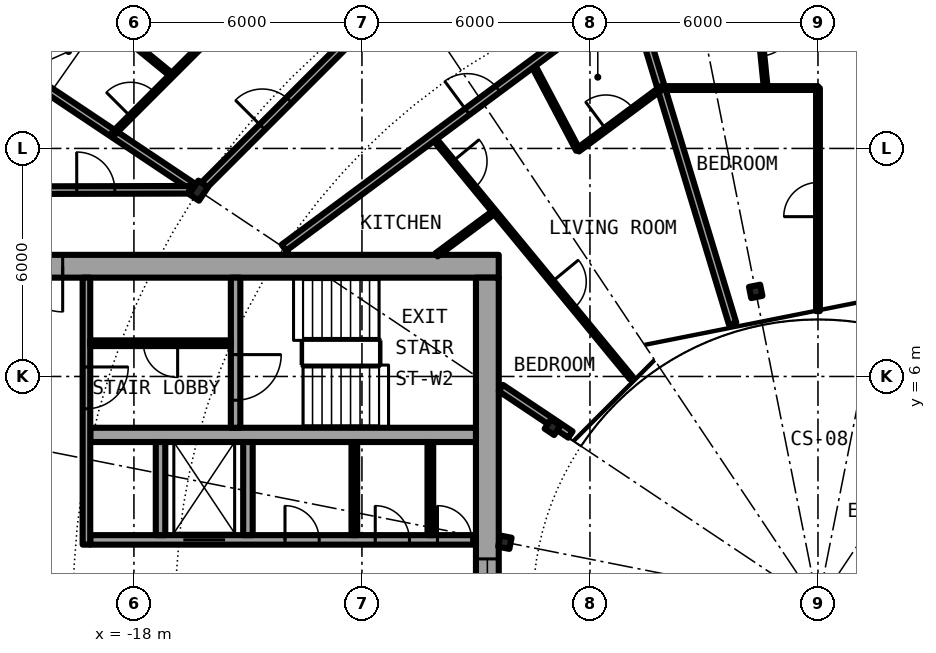
"""IFC4 building model, lengths in metres.
Left out: names, types, materials, properties, quantities, classifications, styles, units other than length and angle.
Written with IfcOpenShell. Run it as: python <this file> out.ifc"""

import sys

from ifc_helpers import new_model, si_unit, direction, frame, frame_2d, origin, origin_2d, place, context, subcontext, project, spatial, rectangle, i_section, extrude, element, fill, save


model = new_model("IFC4")
c1 = context("Model", 3, precision=1e-05, world=origin(), true_north=direction((0.0, 1.0)))
c2 = subcontext(c1, "Body", "Model", "MODEL_VIEW")
j1 = project(units=[si_unit("LENGTHUNIT", "METRE"), si_unit("PLANEANGLEUNIT", "RADIAN")], contexts=[c1])
p1 = place(None, origin())
s1 = spatial("IfcSite", under=j1, at=p1, CompositionType="ELEMENT")
p2 = place(p1, origin())
s2 = spatial("IfcBuilding", under=s1, at=p2, CompositionType="ELEMENT")
p3 = place(p2, frame((0.0, 0.0, 120.8)))
s3 = spatial("IfcBuildingStorey", under=s2, at=p3, CompositionType="ELEMENT", Elevation=120.8)
p4 = place(p3, frame((-16.297, 10.889, 0.0), z_axis=(0.0, 0.0, 1.0), x_axis=(-0.831469612303, 0.55557023302, 0.0)))
e1 = element("IfcColumn", 1, at=p4, inside=s3, PredefinedType="COLUMN", context=c2, shape_type="SweptSolid", body=[
    extrude(i_section(OverallWidth=0.307, OverallDepth=0.432, WebThickness=0.021, FlangeThickness=0.04, FilletRadius=0.027, at=origin_2d()), origin(), (0.0, 0.0, 1.0), 3.05),
])
for number, where, z_axis, x_axis in (
    (2, (-1.639, 8.239, 0.0), (0.0, 0.0, 1.0), (-0.195, 0.981, 0.0)),
    (3, (-6.984, 4.667, 0.0), (0.0, 0.0, 1.0), (-0.831, 0.556, 0.0)),
    (4, (-8.239, 1.639, 0.0), (0.0, 0.0, 1.0), (-0.981, 0.195, 0.0)),
):
    element("IfcColumn", number, at=place(p3, frame(where, z_axis=z_axis, x_axis=x_axis)), inside=s3, PredefinedType="COLUMN", context=c2, shape_type="SweptSolid", body=[
        extrude(i_section(OverallWidth=0.3, OverallDepth=0.3, WebThickness=0.011, FlangeThickness=0.019, FilletRadius=0.027, at=origin_2d()), origin(), (0.0, 0.0, 1.0), 3.05),
    ])
p5 = place(p3, frame((-8.4, 8.9, 0.0), z_axis=(0.0, 0.0, 1.0), x_axis=(-1.0, 0.0, 0.0)))
e5 = element("IfcWall", 5, at=p5, inside=s3, PredefinedType="SHEAR", context=c2, shape_type="SweptSolid", body=[
    extrude(rectangle(XDim=13.8, YDim=0.6, at=frame_2d((6.9, 0.0))), origin(), (0.0, 0.0, 1.0), 3.05),
])
p6 = place(p5, frame((11.475, 0.0, 0.0)))
e6 = element("IfcOpeningElement", 6, at=p6, cuts=e5, PredefinedType="OPENING", context=c2, shape_type="SweptSolid", body=[
    extrude(rectangle(XDim=1.2, YDim=2.3, at=frame_2d((0.6, 1.15))), frame((0.0, 0.31, 0.0), z_axis=(0.0, -1.0, 0.0), x_axis=(1.0, 0.0, 0.0)), (0.0, 0.0, 1.0), 0.62),
])
p7 = place(p3, frame((-8.7, 8.6, 0.0), z_axis=(0.0, 0.0, 1.0), x_axis=(0.0, -1.0, 0.0)))
e7 = element("IfcWall", 7, at=p7, inside=s3, PredefinedType="SHEAR", context=c2, shape_type="SweptSolid", body=[
    extrude(rectangle(XDim=17.2, YDim=0.6, at=frame_2d((8.6, 0.0))), origin(), (0.0, 0.0, 1.0), 3.05),
])
p8 = place(p7, frame((7.4, 0.0, 0.1)))
e8 = element("IfcOpeningElement", 8, at=p8, cuts=e7, PredefinedType="OPENING", context=c2, shape_type="SweptSolid", body=[
    extrude(rectangle(XDim=2.4, YDim=2.2, at=frame_2d((1.2, 1.1))), frame((0.0, 0.31, 0.0), z_axis=(0.0, -1.0, 0.0), x_axis=(1.0, 0.0, 0.0)), (0.0, 0.0, 1.0), 0.62),
])
p9 = place(p3, frame((-19.15, 1.7, 0.0), z_axis=(0.0, 0.0, 1.0), x_axis=(1.0, 0.0, 0.0)))
e9 = element("IfcWall", 9, at=p9, inside=s3, PredefinedType="SHEAR", context=c2, shape_type="SweptSolid", body=[
    extrude(rectangle(XDim=10.15, YDim=0.25, at=frame_2d((5.075, 0.0))), origin(), (0.0, 0.0, 1.0), 3.05),
])
p10 = place(p9, frame((2.45, 0.0, 0.0)))
e10 = element("IfcOpeningElement", 10, at=p10, cuts=e9, PredefinedType="OPENING", context=c2, shape_type="SweptSolid", body=[
    extrude(rectangle(XDim=1.1, YDim=2.3, at=frame_2d((0.55, 1.15))), frame((0.0, 0.135, 0.0), z_axis=(0.0, -1.0, 0.0), x_axis=(1.0, 0.0, 0.0)), (0.0, 0.0, 1.0), 0.27),
])
p11 = place(p9, frame((9.137, 0.0, 0.0)))
e11 = element("IfcOpeningElement", 11, at=p11, cuts=e9, PredefinedType="OPENING", context=c2, shape_type="SweptSolid", body=[
    extrude(rectangle(XDim=0.9, YDim=2.3, at=frame_2d((0.45, 1.15))), frame((0.0, 0.135, 0.0), z_axis=(0.0, -1.0, 0.0), x_axis=(1.0, 0.0, 0.0)), (0.0, 0.0, 1.0), 0.27),
])
p12 = place(p9, frame((7.5, 0.0, 0.0)))
e12 = element("IfcOpeningElement", 12, at=p12, cuts=e9, PredefinedType="OPENING", context=c2, shape_type="SweptSolid", body=[
    extrude(rectangle(XDim=0.9, YDim=2.3, at=frame_2d((0.45, 1.15))), frame((0.0, 0.135, 0.0), z_axis=(0.0, -1.0, 0.0), x_axis=(1.0, 0.0, 0.0)), (0.0, 0.0, 1.0), 0.27),
])
p13 = place(p9, frame((5.125, 0.0, 0.0)))
e13 = element("IfcOpeningElement", 13, at=p13, cuts=e9, PredefinedType="OPENING", context=c2, shape_type="SweptSolid", body=[
    extrude(rectangle(XDim=0.9, YDim=2.3, at=frame_2d((0.45, 1.15))), frame((0.0, 0.135, 0.0), z_axis=(0.0, -1.0, 0.0), x_axis=(1.0, 0.0, 0.0)), (0.0, 0.0, 1.0), 0.27),
])
p14 = place(p3, frame((-9.0, 4.462, 0.0), z_axis=(0.0, 0.0, 1.0), x_axis=(-1.0, 0.0, 0.0)))
e14 = element("IfcWall", 14, at=p14, inside=s3, PredefinedType="SHEAR", context=c2, shape_type="SweptSolid", body=[
    extrude(rectangle(XDim=10.15, YDim=0.375, at=frame_2d((5.075, 0.0))), origin(), (0.0, 0.0, 1.0), 3.05),
])
p15 = place(p3, frame((-15.325, 8.6, 0.0), z_axis=(0.0, 0.0, 1.0), x_axis=(0.0, -1.0, 0.0)))
e15 = element("IfcWall", 15, at=p15, inside=s3, PredefinedType="SHEAR", context=c2, shape_type="SweptSolid", body=[
    extrude(rectangle(XDim=3.95, YDim=0.25, at=frame_2d((1.975, 0.0))), origin(), (0.0, 0.0, 1.0), 3.05),
])
p16 = place(p15, frame((2.025, 0.0, 0.0)))
e16 = element("IfcOpeningElement", 16, at=p16, cuts=e15, PredefinedType="OPENING", context=c2, shape_type="SweptSolid", body=[
    extrude(rectangle(XDim=1.2, YDim=2.3, at=frame_2d((0.6, 1.15))), frame((0.0, 0.135, 0.0), z_axis=(0.0, -1.0, 0.0), x_axis=(1.0, 0.0, 0.0)), (0.0, 0.0, 1.0), 0.27),
])
for number, where, z_axis, x_axis in (
    (17, (-15.0, 1.825, 0.0), (0.0, 0.0, 1.0), (0.0, 1.0, 0.0)),
    (18, (-17.3, 1.825, 0.0), (0.0, 0.0, 1.0), (0.0, 1.0, 0.0)),
):
    element("IfcWall", number, at=place(p3, frame(where, z_axis=z_axis, x_axis=x_axis)), inside=s3, PredefinedType="SOLIDWALL", context=c2, shape_type="SweptSolid", body=[
        extrude(rectangle(XDim=2.45, YDim=0.25, at=frame_2d((1.225, 0.0))), origin(), (0.0, 0.0, 1.0), 2.7),
    ])
p17 = place(p3, frame((-19.25, 8.6, 0.0), z_axis=(0.0, 0.0, 1.0), x_axis=(0.0, -1.0, 0.0)))
e19 = element("IfcWall", 19, at=p17, inside=s3, PredefinedType="SOLIDWALL", context=c2, shape_type="SweptSolid", body=[
    extrude(rectangle(XDim=7.025, YDim=0.2, at=frame_2d((3.513, 0.0))), origin(), (0.0, 0.0, 1.0), 2.7),
])
p18 = place(p17, frame((2.35, 0.0, 0.0)))
e20 = element("IfcOpeningElement", 20, at=p18, cuts=e19, PredefinedType="OPENING", context=c2, shape_type="SweptSolid", body=[
    extrude(rectangle(XDim=1.1, YDim=2.3, at=frame_2d((0.55, 1.15))), frame((0.0, 0.11, 0.0), z_axis=(0.0, -1.0, 0.0), x_axis=(1.0, 0.0, 0.0)), (0.0, 0.0, 1.0), 0.22),
])
for number, where, z_axis, x_axis in (
    (21, (-10.2, 1.825, 0.0), (0.0, 0.0, 1.0), (0.0, 1.0, 0.0)),
    (22, (-12.2, 1.825, 0.0), (0.0, 0.0, 1.0), (0.0, 1.0, 0.0)),
):
    element("IfcWall", number, at=place(p3, frame(where, z_axis=z_axis, x_axis=x_axis)), inside=s3, PredefinedType="PARTITIONING", context=c2, shape_type="SweptSolid", body=[
        extrude(rectangle(XDim=2.45, YDim=0.15, at=frame_2d((1.225, 0.0))), origin(), (0.0, 0.0, 1.0), 2.7),
    ])
p19 = place(p3, frame((-15.45, 6.875, 0.0), z_axis=(0.0, 0.0, 1.0), x_axis=(-1.0, 0.0, 0.0)))
e23 = element("IfcWall", 23, at=p19, inside=s3, PredefinedType="PARTITIONING", context=c2, shape_type="SweptSolid", body=[
    extrude(rectangle(XDim=3.7, YDim=0.15, at=frame_2d((1.85, 0.0))), origin(), (0.0, 0.0, 1.0), 2.7),
])
p20 = place(p19, frame((1.4, 0.0, 0.0)))
e24 = element("IfcOpeningElement", 24, at=p20, cuts=e23, PredefinedType="OPENING", context=c2, shape_type="SweptSolid", body=[
    extrude(rectangle(XDim=0.9, YDim=2.3, at=frame_2d((0.45, 1.15))), frame((0.0, 0.085, 0.0), z_axis=(0.0, -1.0, 0.0), x_axis=(1.0, 0.0, 0.0)), (0.0, 0.0, 1.0), 0.17),
])
p21 = place(p3, frame((-4.907, 16.172, 0.0), z_axis=(0.0, 0.0, 1.0), x_axis=(0.289977130626, -0.957033575019, 0.0)))
e25 = element("IfcWall", 25, at=p21, inside=s3, PredefinedType="PARTITIONING", context=c2, shape_type="SweptSolid", body=[
    extrude(rectangle(XDim=9.18, YDim=0.2, at=frame_2d((4.59, 0.0))), origin(), (0.0, 0.0, 1.0), 2.7),
])
p22 = place(p3, frame((-22.595, 15.098, 0.0), z_axis=(0.0, 0.0, 1.0), x_axis=(0.831406593008, -0.555664536482, 0.0)))
e26 = element("IfcWall", 26, at=p22, inside=s3, PredefinedType="PARTITIONING", context=c2, shape_type="SweptSolid", body=[
    extrude(rectangle(XDim=7.358, YDim=0.2, at=frame_2d((3.679, 0.0))), origin(), (0.0, 0.0, 1.0), 2.7),
])
p23 = place(p3, frame((-21.023, 17.22, 0.0), z_axis=(0.0, 0.0, 1.0), x_axis=(0.773517471898, -0.633774976367, 0.0)))
e27 = element("IfcWall", 27, at=p23, inside=s3, PredefinedType="PARTITIONING", context=c2, shape_type="SweptSolid", body=[
    extrude(rectangle(XDim=5.196, YDim=0.1, at=frame_2d((2.598, 0.0))), origin(), (0.0, 0.0, 1.0), 2.7),
])
p24 = place(p3, frame((-10.132, 12.296, 0.0), z_axis=(0.0, 0.0, 1.0), x_axis=(0.635976043025, -0.771708800454, 0.0)))
e28 = element("IfcWall", 28, at=p24, inside=s3, PredefinedType="PARTITIONING", context=c2, shape_type="SweptSolid", body=[
    extrude(rectangle(XDim=8.213, YDim=0.1, at=frame_2d((4.106, 0.0))), origin(), (0.0, 0.0, 1.0), 2.7),
])
p25 = place(p24, frame((0.823, 0.0, 0.0)))
e29 = element("IfcOpeningElement", 29, at=p25, cuts=e28, PredefinedType="OPENING", context=c2, shape_type="SweptSolid", body=[
    extrude(rectangle(XDim=0.9, YDim=2.3, at=frame_2d((0.45, 1.15))), frame((0.0, 0.06, 0.0), z_axis=(0.0, -1.0, 0.0), x_axis=(1.0, 0.0, 0.0)), (0.0, 0.0, 1.0), 0.12),
])
p26 = place(p24, frame((4.929, 0.0, 0.0)))
e30 = element("IfcOpeningElement", 30, at=p26, cuts=e28, PredefinedType="OPENING", context=c2, shape_type="SweptSolid", body=[
    extrude(rectangle(XDim=0.9, YDim=2.3, at=frame_2d((0.45, 1.15))), frame((0.0, 0.06, 0.0), z_axis=(0.0, -1.0, 0.0), x_axis=(1.0, 0.0, 0.0)), (0.0, 0.0, 1.0), 0.12),
])
p27 = place(p3, frame((-7.519, 14.234, 0.0), z_axis=(0.0, 0.0, 1.0), x_axis=(0.467001992543, -0.884256263173, 0.0)))
e31 = element("IfcWall", 31, at=p27, inside=s3, PredefinedType="PARTITIONING", context=c2, shape_type="SweptSolid", body=[
    extrude(rectangle(XDim=2.572, YDim=0.1, at=frame_2d((1.286, 0.0))), origin(), (0.0, 0.0, 1.0), 2.7),
])
p28 = place(p3, frame((-1.635, 16.172, 0.0), z_axis=(0.0, 0.0, 1.0), x_axis=(0.100527855112, -0.994934244233, 0.0)))
e32 = element("IfcWall", 32, at=p28, inside=s3, PredefinedType="PARTITIONING", context=c2, shape_type="SweptSolid", body=[
    extrude(rectangle(XDim=2.596, YDim=0.1, at=frame_2d((1.298, 0.0))), origin(), (0.0, 0.0, 1.0), 2.7),
])
p29 = place(p28, frame((0.848, 0.0, 0.0)))
e33 = element("IfcOpeningElement", 33, at=p29, cuts=e32, PredefinedType="OPENING", context=c2, shape_type="SweptSolid", body=[
    extrude(rectangle(XDim=0.9, YDim=2.3, at=frame_2d((0.45, 1.15))), frame((0.0, 0.06, 0.0), z_axis=(0.0, -1.0, 0.0), x_axis=(1.0, 0.0, 0.0)), (0.0, 0.0, 1.0), 0.12),
])
p30 = place(p3, frame((0.0, 7.72, 0.0), z_axis=(0.0, 0.0, 1.0), x_axis=(0.0, 1.0, 0.0)))
e34 = element("IfcWall", 34, at=p30, inside=s3, PredefinedType="PARTITIONING", context=c2, shape_type="SweptSolid", body=[
    extrude(rectangle(XDim=5.869, YDim=0.1, at=frame_2d((2.935, 0.0))), origin(), (0.0, 0.0, 1.0), 2.7),
])
p31 = place(p30, frame((2.485, 0.0, 0.0)))
e35 = element("IfcOpeningElement", 35, at=p31, cuts=e34, PredefinedType="OPENING", context=c2, shape_type="SweptSolid", body=[
    extrude(rectangle(XDim=0.9, YDim=2.3, at=frame_2d((0.45, 1.15))), frame((0.0, 0.06, 0.0), z_axis=(0.0, -1.0, 0.0), x_axis=(1.0, 0.0, 0.0)), (0.0, 0.0, 1.0), 0.12),
])
p32 = place(p3, frame((-6.513, 4.472, 0.0), z_axis=(0.0, 0.0, 1.0), x_axis=(-0.831333375071, 0.555774072347, 0.0)))
e36 = element("IfcWall", 36, at=p32, inside=s3, PredefinedType="PARTITIONING", context=c2, shape_type="SweptSolid", body=[
    extrude(rectangle(XDim=2.203, YDim=0.2, at=frame_2d((1.101, 0.0))), origin(), (0.0, 0.0, 1.0), 2.7),
])
p33 = place(p3, frame((-21.675, 10.9, 0.0), z_axis=(0.0, 0.0, 1.0), x_axis=(0.999997173357, 0.002377662213, 0.0)))
e37 = element("IfcWall", 37, at=p33, inside=s3, PredefinedType="PARTITIONING", context=c2, shape_type="SweptSolid", body=[
    extrude(rectangle(XDim=5.134, YDim=0.2, at=frame_2d((2.567, 0.0))), origin(), (0.0, 0.0, 1.0), 2.7),
])
p34 = place(p33, frame((2.171, 0.0, 0.0)))
e38 = element("IfcOpeningElement", 38, at=p34, cuts=e37, PredefinedType="OPENING", context=c2, shape_type="SweptSolid", body=[
    extrude(rectangle(XDim=1.0, YDim=2.3, at=frame_2d((0.5, 1.15))), frame((0.0, 0.11, 0.0), z_axis=(0.0, -1.0, 0.0), x_axis=(1.0, 0.0, 0.0)), (0.0, 0.0, 1.0), 0.22),
])
p35 = place(p3, frame((-10.039, 9.2, 0.0), z_axis=(0.0, 0.0, 1.0), x_axis=(0.803149591038, 0.595777420196, 0.0)))
e39 = element("IfcWall", 39, at=p35, inside=s3, PredefinedType="PARTITIONING", context=c2, shape_type="SweptSolid", body=[
    extrude(rectangle(XDim=1.9, YDim=0.1, at=frame_2d((0.95, 0.0))), origin(), (0.0, 0.0, 1.0), 2.7),
])
p36 = place(p3, frame((-6.318, 11.96, 0.0), z_axis=(0.0, 0.0, 1.0), x_axis=(0.803128348509, 0.595806055542, 0.0)))
e40 = element("IfcWall", 40, at=p36, inside=s3, PredefinedType="PARTITIONING", context=c2, shape_type="SweptSolid", body=[
    extrude(rectangle(XDim=2.734, YDim=0.1, at=frame_2d((1.367, 0.0))), origin(), (0.0, 0.0, 1.0), 2.7),
])
p37 = place(p36, frame((0.917, 0.0, 0.0)))
e41 = element("IfcOpeningElement", 41, at=p37, cuts=e40, PredefinedType="OPENING", context=c2, shape_type="SweptSolid", body=[
    extrude(rectangle(XDim=0.9, YDim=2.3, at=frame_2d((0.45, 1.15))), frame((0.0, 0.06, 0.0), z_axis=(0.0, -1.0, 0.0), x_axis=(1.0, 0.0, 0.0)), (0.0, 0.0, 1.0), 0.12),
])
p38 = place(p3, frame((-4.122, 13.589, 0.0), z_axis=(0.0, 0.0, 1.0), x_axis=(1.0, 0.0, 0.0)))
e42 = element("IfcWall", 42, at=p38, inside=s3, PredefinedType="PARTITIONING", context=c2, shape_type="SweptSolid", body=[
    extrude(rectangle(XDim=4.122, YDim=0.1, at=frame_2d((2.061, 0.0))), origin(), (0.0, 0.0, 1.0), 2.7),
])
p39 = place(p3, frame((-14.052, 9.389, 0.0), z_axis=(0.0, 0.0, 1.0), x_axis=(0.803204584823, 0.59570327758, 0.0)))
e43 = element("IfcWall", 43, at=p39, inside=s3, PredefinedType="PARTITIONING", context=c2, shape_type="SweptSolid", body=[
    extrude(rectangle(XDim=11.387, YDim=0.2, at=frame_2d((5.693, 0.0))), origin(), (0.0, 0.0, 1.0), 2.7),
])
p40 = place(p39, frame((6.007, 0.0, 0.0)))
e44 = element("IfcOpeningElement", 44, at=p40, cuts=e43, PredefinedType="OPENING", context=c2, shape_type="SweptSolid", body=[
    extrude(rectangle(XDim=1.0, YDim=2.3, at=frame_2d((0.5, 1.15))), frame((0.0, 0.11, 0.0), z_axis=(0.0, -1.0, 0.0), x_axis=(1.0, 0.0, 0.0)), (0.0, 0.0, 1.0), 0.22),
])
p41 = place(p3, frame((-16.186, 11.0, 0.0), z_axis=(0.0, 0.0, 1.0), x_axis=(0.707106781187, 0.707106781187, 0.0)))
e45 = element("IfcWall", 45, at=p41, inside=s3, PredefinedType="PARTITIONING", context=c2, shape_type="SweptSolid", body=[
    extrude(rectangle(XDim=7.334, YDim=0.2, at=frame_2d((3.667, 0.0))), origin(), (0.0, 0.0, 1.0), 2.39),
])
p42 = place(p41, frame((2.211, 0.0, 0.0)))
e46 = element("IfcOpeningElement", 46, at=p42, cuts=e45, PredefinedType="OPENING", context=c2, shape_type="SweptSolid", body=[
    extrude(rectangle(XDim=1.0, YDim=2.3, at=frame_2d((0.5, 1.15))), frame((0.0, 0.11, 0.0), z_axis=(0.0, -1.0, 0.0), x_axis=(1.0, 0.0, 0.0)), (0.0, 0.0, 1.0), 0.22),
])
p43 = place(p3, frame((-18.542, 12.389, 0.0), z_axis=(0.0, 0.0, 1.0), x_axis=(0.707190945535, 0.707022606819, 0.0)))
e47 = element("IfcWall", 47, at=p43, inside=s3, PredefinedType="PARTITIONING", context=c2, shape_type="SweptSolid", body=[
    extrude(rectangle(XDim=4.351, YDim=0.1, at=frame_2d((2.175, 0.0))), origin(), (0.0, 0.0, 1.0), 2.7),
])
p44 = place(p43, frame((0.639, 0.0, 0.0)))
e48 = element("IfcOpeningElement", 48, at=p44, cuts=e47, PredefinedType="OPENING", context=c2, shape_type="SweptSolid", body=[
    extrude(rectangle(XDim=0.9, YDim=2.3, at=frame_2d((0.45, 1.15))), frame((0.0, 0.06, 0.0), z_axis=(0.0, -1.0, 0.0), x_axis=(1.0, 0.0, 0.0)), (0.0, 0.0, 1.0), 0.12),
])
p45 = place(p10, origin())
e49 = element("IfcDoor", 49, at=p45, inside=s3, OperationType="DOUBLE_DOOR_SLIDING", PredefinedType="DOOR", context=c2, shape_type="SweptSolid", body=[
    extrude(rectangle(XDim=1.1, YDim=2.3, at=frame_2d((0.55, 1.15))), frame((0.0, 0.025, 0.0), z_axis=(0.0, -1.0, 0.0), x_axis=(1.0, 0.0, 0.0)), (0.0, 0.0, 1.0), 0.05),
])
fill(e10, e49)
p46 = place(p11, origin())
e50 = element("IfcDoor", 50, at=p46, inside=s3, OperationType="SINGLE_SWING_LEFT", PredefinedType="DOOR", context=c2, shape_type="SweptSolid", body=[
    extrude(rectangle(XDim=0.9, YDim=2.3, at=frame_2d((0.45, 1.15))), frame((0.0, 0.025, 0.0), z_axis=(0.0, -1.0, 0.0), x_axis=(1.0, 0.0, 0.0)), (0.0, 0.0, 1.0), 0.05),
])
fill(e11, e50)
p47 = place(p12, origin())
e51 = element("IfcDoor", 51, at=p47, inside=s3, OperationType="SINGLE_SWING_LEFT", PredefinedType="DOOR", context=c2, shape_type="SweptSolid", body=[
    extrude(rectangle(XDim=0.9, YDim=2.3, at=frame_2d((0.45, 1.15))), frame((0.0, 0.025, 0.0), z_axis=(0.0, -1.0, 0.0), x_axis=(1.0, 0.0, 0.0)), (0.0, 0.0, 1.0), 0.05),
])
fill(e12, e51)
p48 = place(p13, origin())
e52 = element("IfcDoor", 52, at=p48, inside=s3, OperationType="SINGLE_SWING_LEFT", PredefinedType="DOOR", context=c2, shape_type="SweptSolid", body=[
    extrude(rectangle(XDim=0.9, YDim=2.3, at=frame_2d((0.45, 1.15))), frame((0.0, 0.025, 0.0), z_axis=(0.0, -1.0, 0.0), x_axis=(1.0, 0.0, 0.0)), (0.0, 0.0, 1.0), 0.05),
])
fill(e13, e52)
p49 = place(p20, origin())
e53 = element("IfcDoor", 53, at=p49, inside=s3, OperationType="SINGLE_SWING_LEFT", PredefinedType="DOOR", context=c2, shape_type="SweptSolid", body=[
    extrude(rectangle(XDim=0.9, YDim=2.3, at=frame_2d((0.45, 1.15))), frame((0.0, 0.025, 0.0), z_axis=(0.0, -1.0, 0.0), x_axis=(1.0, 0.0, 0.0)), (0.0, 0.0, 1.0), 0.05),
])
fill(e24, e53)
p50 = place(p16, origin())
e54 = element("IfcDoor", 54, at=p50, inside=s3, OperationType="SINGLE_SWING_LEFT", PredefinedType="DOOR", context=c2, shape_type="SweptSolid", body=[
    extrude(rectangle(XDim=1.2, YDim=2.3, at=frame_2d((0.6, 1.15))), frame((0.0, 0.025, 0.0), z_axis=(0.0, -1.0, 0.0), x_axis=(1.0, 0.0, 0.0)), (0.0, 0.0, 1.0), 0.05),
])
fill(e16, e54)
p51 = place(p18, origin())
e55 = element("IfcDoor", 55, at=p51, inside=s3, OperationType="SINGLE_SWING_RIGHT", PredefinedType="DOOR", context=c2, shape_type="SweptSolid", body=[
    extrude(rectangle(XDim=1.1, YDim=2.3, at=frame_2d((0.55, 1.15))), frame((0.0, 0.025, 0.0), z_axis=(0.0, -1.0, 0.0), x_axis=(1.0, 0.0, 0.0)), (0.0, 0.0, 1.0), 0.05),
])
fill(e20, e55)
p52 = place(p6, origin())
e56 = element("IfcDoor", 56, at=p52, inside=s3, OperationType="SINGLE_SWING_LEFT", PredefinedType="DOOR", context=c2, shape_type="SweptSolid", body=[
    extrude(rectangle(XDim=1.2, YDim=2.3, at=frame_2d((0.6, 1.15))), frame((0.0, 0.025, 0.0), z_axis=(0.0, -1.0, 0.0), x_axis=(1.0, 0.0, 0.0)), (0.0, 0.0, 1.0), 0.05),
])
fill(e6, e56)
p53 = place(p8, origin())
e57 = element("IfcWindow", 57, at=p53, inside=s3, PartitioningType="SINGLE_PANEL", PredefinedType="WINDOW", context=c2, shape_type="SweptSolid", body=[
    extrude(rectangle(XDim=2.4, YDim=2.2, at=frame_2d((1.2, 1.1))), frame((0.0, 0.03, 0.0), z_axis=(0.0, -1.0, 0.0), x_axis=(1.0, 0.0, 0.0)), (0.0, 0.0, 1.0), 0.06),
])
fill(e8, e57)
p54 = place(p42, origin())
e58 = element("IfcDoor", 58, at=p54, inside=s3, OperationType="SINGLE_SWING_LEFT", PredefinedType="DOOR", context=c2, shape_type="SweptSolid", body=[
    extrude(rectangle(XDim=1.0, YDim=2.3, at=frame_2d((0.5, 1.15))), frame((0.0, 0.025, 0.0), z_axis=(0.0, -1.0, 0.0), x_axis=(1.0, 0.0, 0.0)), (0.0, 0.0, 1.0), 0.05),
])
fill(e46, e58)
p55 = place(p44, origin())
e59 = element("IfcDoor", 59, at=p55, inside=s3, OperationType="SINGLE_SWING_LEFT", PredefinedType="DOOR", context=c2, shape_type="SweptSolid", body=[
    extrude(rectangle(XDim=0.9, YDim=2.3, at=frame_2d((0.45, 1.15))), frame((0.0, 0.025, 0.0), z_axis=(0.0, -1.0, 0.0), x_axis=(1.0, 0.0, 0.0)), (0.0, 0.0, 1.0), 0.05),
])
fill(e48, e59)
p56 = place(p29, origin())
e60 = element("IfcDoor", 60, at=p56, inside=s3, OperationType="SINGLE_SWING_LEFT", PredefinedType="DOOR", context=c2, shape_type="SweptSolid", body=[
    extrude(rectangle(XDim=0.9, YDim=2.3, at=frame_2d((0.45, 1.15))), frame((0.0, 0.025, 0.0), z_axis=(0.0, -1.0, 0.0), x_axis=(1.0, 0.0, 0.0)), (0.0, 0.0, 1.0), 0.05),
])
fill(e33, e60)
p57 = place(p31, origin())
e61 = element("IfcDoor", 61, at=p57, inside=s3, OperationType="SINGLE_SWING_RIGHT", PredefinedType="DOOR", context=c2, shape_type="SweptSolid", body=[
    extrude(rectangle(XDim=0.9, YDim=2.3, at=frame_2d((0.45, 1.15))), frame((0.0, 0.025, 0.0), z_axis=(0.0, -1.0, 0.0), x_axis=(1.0, 0.0, 0.0)), (0.0, 0.0, 1.0), 0.05),
])
fill(e35, e61)
p58 = place(p40, origin())
e62 = element("IfcDoor", 62, at=p58, inside=s3, OperationType="SINGLE_SWING_RIGHT", PredefinedType="DOOR", context=c2, shape_type="SweptSolid", body=[
    extrude(rectangle(XDim=1.0, YDim=2.3, at=frame_2d((0.5, 1.15))), frame((0.0, 0.025, 0.0), z_axis=(0.0, -1.0, 0.0), x_axis=(1.0, 0.0, 0.0)), (0.0, 0.0, 1.0), 0.05),
])
fill(e44, e62)
p59 = place(p37, origin())
e63 = element("IfcDoor", 63, at=p59, inside=s3, OperationType="SINGLE_SWING_RIGHT", PredefinedType="DOOR", context=c2, shape_type="SweptSolid", body=[
    extrude(rectangle(XDim=0.9, YDim=2.3, at=frame_2d((0.45, 1.15))), frame((0.0, 0.025, 0.0), z_axis=(0.0, -1.0, 0.0), x_axis=(1.0, 0.0, 0.0)), (0.0, 0.0, 1.0), 0.05),
])
fill(e41, e63)
p60 = place(p25, origin())
e64 = element("IfcDoor", 64, at=p60, inside=s3, OperationType="SINGLE_SWING_LEFT", PredefinedType="DOOR", context=c2, shape_type="SweptSolid", body=[
    extrude(rectangle(XDim=0.9, YDim=2.3, at=frame_2d((0.45, 1.15))), frame((0.0, 0.025, 0.0), z_axis=(0.0, -1.0, 0.0), x_axis=(1.0, 0.0, 0.0)), (0.0, 0.0, 1.0), 0.05),
])
fill(e29, e64)
p61 = place(p26, origin())
e65 = element("IfcDoor", 65, at=p61, inside=s3, OperationType="SINGLE_SWING_RIGHT", PredefinedType="DOOR", context=c2, shape_type="SweptSolid", body=[
    extrude(rectangle(XDim=0.9, YDim=2.3, at=frame_2d((0.45, 1.15))), frame((0.0, 0.025, 0.0), z_axis=(0.0, -1.0, 0.0), x_axis=(1.0, 0.0, 0.0)), (0.0, 0.0, 1.0), 0.05),
])
fill(e30, e65)
p62 = place(p34, origin())
e66 = element("IfcDoor", 66, at=p62, inside=s3, OperationType="SINGLE_SWING_RIGHT", PredefinedType="DOOR", context=c2, shape_type="SweptSolid", body=[
    extrude(rectangle(XDim=1.0, YDim=2.3, at=frame_2d((0.5, 1.15))), frame((0.0, 0.025, 0.0), z_axis=(0.0, -1.0, 0.0), x_axis=(1.0, 0.0, 0.0)), (0.0, 0.0, 1.0), 0.05),
])
fill(e38, e66)
save(model, sys.argv[1])
